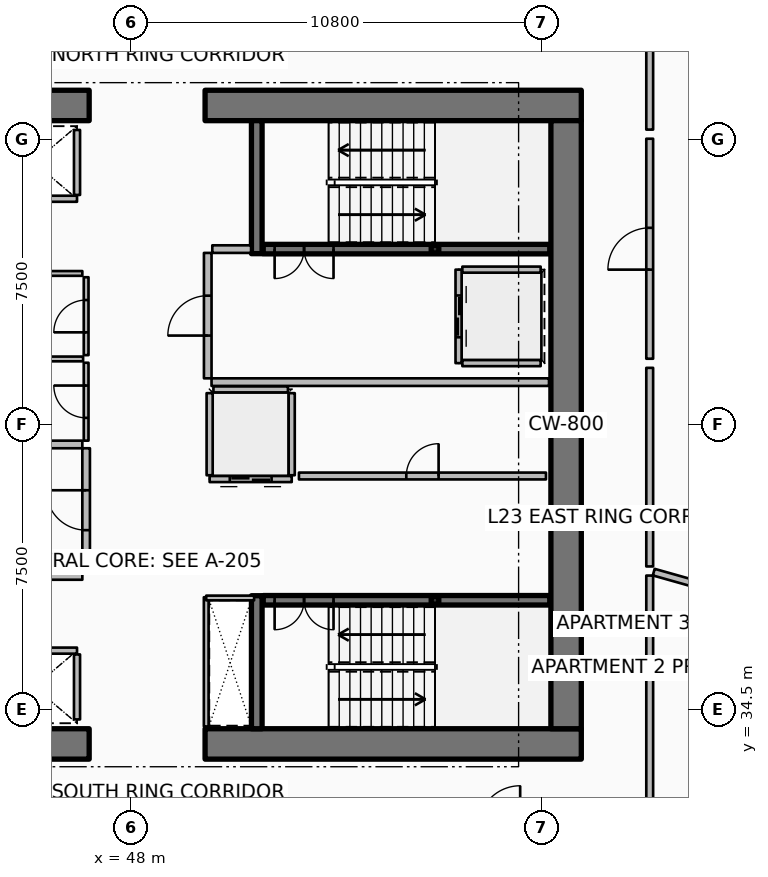
"""IFC4 building model, lengths in metres.
Left out: names, types, materials, properties, quantities, classifications, styles, units other than length and angle.
Written with IfcOpenShell. Run it as: python <this file> out.ifc"""

import sys

from ifc_helpers import new_model, si_unit, direction, frame, frame_2d, origin, origin_2d, place, context, subcontext, project, spatial, rectangle, hollow_rectangle, extrude, element, fill, save


model = new_model("IFC4")
c1 = context("Model", 3, precision=1e-05, world=origin(), true_north=direction((0.0, 1.0)))
c2 = subcontext(c1, "Body", "Model", "MODEL_VIEW")
j1 = project(units=[si_unit("LENGTHUNIT", "METRE"), si_unit("PLANEANGLEUNIT", "RADIAN")], contexts=[c1])
p1 = place(None, origin())
s1 = spatial("IfcSite", under=j1, at=p1, CompositionType="ELEMENT")
p2 = place(p1, origin())
s2 = spatial("IfcBuilding", under=s1, at=p2, CompositionType="ELEMENT")
p3 = place(p2, frame((0.0, 0.0, 93.9)))
s3 = spatial("IfcBuildingStorey", under=s2, at=p3, CompositionType="ELEMENT", Elevation=93.9)
p4 = place(p3, frame((37.0, 33.6, 0.0), z_axis=(0.0, 0.0, 1.0), x_axis=(1.0, 0.0, 0.0)))
e1 = element("IfcWall", 1, at=p4, inside=s3, PredefinedType="SHEAR", context=c2, shape_type="SweptSolid", body=[
    extrude(rectangle(XDim=9.9, YDim=0.8, at=frame_2d((4.95, 0.0))), origin(), (0.0, 0.0, 1.0), 3.75),
])
p5 = place(p3, frame((49.95, 33.6, 0.0), z_axis=(0.0, 0.0, 1.0), x_axis=(1.0, 0.0, 0.0)))
e2 = element("IfcWall", 2, at=p5, inside=s3, PredefinedType="SHEAR", context=c2, shape_type="SweptSolid", body=[
    extrude(rectangle(XDim=9.9, YDim=0.8, at=frame_2d((4.95, 0.0))), origin(), (0.0, 0.0, 1.0), 3.75),
])
p6 = place(p3, frame((37.0, 50.4, 0.0), z_axis=(0.0, 0.0, 1.0), x_axis=(1.0, 0.0, 0.0)))
e3 = element("IfcWall", 3, at=p6, inside=s3, PredefinedType="SHEAR", context=c2, shape_type="SweptSolid", body=[
    extrude(rectangle(XDim=9.9, YDim=0.8, at=frame_2d((4.95, 0.0))), origin(), (0.0, 0.0, 1.0), 3.75),
])
p7 = place(p3, frame((49.95, 50.4, 0.0), z_axis=(0.0, 0.0, 1.0), x_axis=(1.0, 0.0, 0.0)))
e4 = element("IfcWall", 4, at=p7, inside=s3, PredefinedType="SHEAR", context=c2, shape_type="SweptSolid", body=[
    extrude(rectangle(XDim=9.9, YDim=0.8, at=frame_2d((4.95, 0.0))), origin(), (0.0, 0.0, 1.0), 3.75),
])
p8 = place(p3, frame((59.45, 34.0, 0.0), z_axis=(0.0, 0.0, 1.0), x_axis=(0.0, 1.0, 0.0)))
e5 = element("IfcWall", 5, at=p8, inside=s3, PredefinedType="SHEAR", context=c2, shape_type="SweptSolid", body=[
    extrude(rectangle(XDim=16.0, YDim=0.8, at=frame_2d((8.0, 0.0))), origin(), (0.0, 0.0, 1.0), 3.75),
])
for number, where, z_axis, x_axis in (
    (6, (51.31, 46.5, 0.0), (0.0, 0.0, 1.0), (0.0, 1.0, 0.0)),
    (7, (51.31, 34.0, 0.0), (0.0, 0.0, 1.0), (0.0, 1.0, 0.0)),
):
    element("IfcWall", number, at=place(p3, frame(where, z_axis=z_axis, x_axis=x_axis)), inside=s3, PredefinedType="SHEAR", context=c2, shape_type="SweptSolid", body=[
        extrude(rectangle(XDim=3.5, YDim=0.28, at=frame_2d((1.75, 0.0))), origin(), (0.0, 0.0, 1.0), 3.75),
    ])
for number, where, z_axis, x_axis in (
    (8, (56.0, 46.62, 0.0), (0.0, 0.0, 1.0), (1.0, 0.0, 0.0)),
    (9, (56.0, 37.38, 0.0), (0.0, 0.0, 1.0), (1.0, 0.0, 0.0)),
):
    element("IfcColumn", number, at=place(p3, frame(where, z_axis=z_axis, x_axis=x_axis)), inside=s3, PredefinedType="COLUMN", context=c2, shape_type="SweptSolid", body=[
        extrude(hollow_rectangle(XDim=0.2, YDim=0.2, WallThickness=0.01, InnerFilletRadius=0.01, OuterFilletRadius=0.02, at=origin_2d()), origin(), (0.0, 0.0, 1.0), 1.67),
    ])
p9 = place(p3, frame((51.48, 46.62, 0.0), z_axis=(0.0, 0.0, 1.0), x_axis=(1.0, 0.0, 0.0)))
e10 = element("IfcWall", 10, at=p9, inside=s3, PredefinedType="SOLIDWALL", context=c2, shape_type="SweptSolid", body=[
    extrude(rectangle(XDim=7.54, YDim=0.25, at=frame_2d((3.77, 0.0))), origin(), (0.0, 0.0, 1.0), 3.5),
])
p10 = place(p9, frame((0.3, 0.0, 0.0)))
e11 = element("IfcOpeningElement", 11, at=p10, cuts=e10, PredefinedType="OPENING", context=c2, shape_type="SweptSolid", body=[
    extrude(rectangle(XDim=1.55, YDim=2.15, at=frame_2d((0.775, 1.075))), frame((0.0, 0.135, 0.0), z_axis=(0.0, -1.0, 0.0), x_axis=(1.0, 0.0, 0.0)), (0.0, 0.0, 1.0), 0.27),
])
p11 = place(p3, frame((51.48, 37.38, 0.0), z_axis=(0.0, 0.0, 1.0), x_axis=(1.0, 0.0, 0.0)))
e12 = element("IfcWall", 12, at=p11, inside=s3, PredefinedType="SOLIDWALL", context=c2, shape_type="SweptSolid", body=[
    extrude(rectangle(XDim=7.54, YDim=0.25, at=frame_2d((3.77, 0.0))), origin(), (0.0, 0.0, 1.0), 3.5),
])
p12 = place(p11, frame((0.3, 0.0, 0.0)))
e13 = element("IfcOpeningElement", 13, at=p12, cuts=e12, PredefinedType="OPENING", context=c2, shape_type="SweptSolid", body=[
    extrude(rectangle(XDim=1.55, YDim=2.15, at=frame_2d((0.775, 1.075))), frame((0.0, 0.135, 0.0), z_axis=(0.0, -1.0, 0.0), x_axis=(1.0, 0.0, 0.0)), (0.0, 0.0, 1.0), 0.27),
])
p13 = place(p3, frame((46.58, 47.945, 0.0), z_axis=(0.0, 0.0, 1.0), x_axis=(-1.0, 0.0, 0.0)))
e14 = element("IfcWall", 14, at=p13, inside=s3, PredefinedType="PARTITIONING", context=c2, shape_type="SweptSolid", body=[
    extrude(rectangle(XDim=2.26, YDim=0.16, at=frame_2d((1.13, 0.0))), origin(), (0.0, 0.0, 1.0), 3.5),
])
p14 = place(p3, frame((46.58, 48.045, 0.0), z_axis=(0.0, 0.0, 1.0), x_axis=(0.0, 1.0, 0.0)))
e15 = element("IfcWall", 15, at=p14, inside=s3, PredefinedType="PARTITIONING", context=c2, shape_type="SweptSolid", body=[
    extrude(rectangle(XDim=1.71, YDim=0.16, at=frame_2d((0.855, 0.0))), origin(), (0.0, 0.0, 1.0), 3.5),
])
p15 = place(p3, frame((44.32, 36.055, 0.0), z_axis=(0.0, 0.0, 1.0), x_axis=(1.0, 0.0, 0.0)))
e16 = element("IfcWall", 16, at=p15, inside=s3, PredefinedType="PARTITIONING", context=c2, shape_type="SweptSolid", body=[
    extrude(rectangle(XDim=2.26, YDim=0.16, at=frame_2d((1.13, 0.0))), origin(), (0.0, 0.0, 1.0), 3.5),
])
p16 = place(p3, frame((46.58, 34.245, 0.0), z_axis=(0.0, 0.0, 1.0), x_axis=(0.0, 1.0, 0.0)))
e17 = element("IfcWall", 17, at=p16, inside=s3, PredefinedType="PARTITIONING", context=c2, shape_type="SweptSolid", body=[
    extrude(rectangle(XDim=1.71, YDim=0.16, at=frame_2d((0.855, 0.0))), origin(), (0.0, 0.0, 1.0), 3.5),
])
p17 = place(p3, frame((56.62, 46.08, 0.0), z_axis=(0.0, 0.0, 1.0), x_axis=(0.0, -1.0, 0.0)))
e18 = element("IfcWall", 18, at=p17, inside=s3, PredefinedType="PARTITIONING", context=c2, shape_type="SweptSolid", body=[
    extrude(rectangle(XDim=2.46, YDim=0.16, at=frame_2d((1.23, 0.0))), origin(), (0.0, 0.0, 1.0), 3.5),
])
p18 = place(p17, frame((0.68, 0.0, 0.0)))
e19 = element("IfcOpeningElement", 19, at=p18, cuts=e18, PredefinedType="OPENING", context=c2, shape_type="SweptSolid", body=[
    extrude(rectangle(XDim=1.1, YDim=2.1, at=frame_2d((0.55, 1.05))), frame((0.0, 0.09, 0.0), z_axis=(0.0, -1.0, 0.0), x_axis=(1.0, 0.0, 0.0)), (0.0, 0.0, 1.0), 0.18),
])
for number, where, z_axis, x_axis in (
    (20, (56.72, 46.08, 0.0), (0.0, 0.0, 1.0), (1.0, 0.0, 0.0)),
    (21, (56.72, 43.62, 0.0), (0.0, 0.0, 1.0), (1.0, 0.0, 0.0)),
):
    element("IfcWall", number, at=place(p3, frame(where, z_axis=z_axis, x_axis=x_axis)), inside=s3, PredefinedType="PARTITIONING", context=c2, shape_type="SweptSolid", body=[
        extrude(rectangle(XDim=2.06, YDim=0.16, at=frame_2d((1.03, 0.0))), origin(), (0.0, 0.0, 1.0), 3.5),
    ])
p19 = place(p3, frame((52.23, 40.57, 0.0), z_axis=(0.0, 0.0, 1.0), x_axis=(-1.0, 0.0, 0.0)))
e22 = element("IfcWall", 22, at=p19, inside=s3, PredefinedType="PARTITIONING", context=c2, shape_type="SweptSolid", body=[
    extrude(rectangle(XDim=2.16, YDim=0.16, at=frame_2d((1.08, 0.0))), origin(), (0.0, 0.0, 1.0), 3.5),
])
p20 = place(p19, frame((0.53, 0.0, 0.0)))
e23 = element("IfcOpeningElement", 23, at=p20, cuts=e22, PredefinedType="OPENING", context=c2, shape_type="SweptSolid", body=[
    extrude(rectangle(XDim=1.1, YDim=2.1, at=frame_2d((0.55, 1.05))), frame((0.0, 0.09, 0.0), z_axis=(0.0, -1.0, 0.0), x_axis=(1.0, 0.0, 0.0)), (0.0, 0.0, 1.0), 0.18),
])
for number, where, z_axis, x_axis in (
    (24, (52.23, 40.67, 0.0), (0.0, 0.0, 1.0), (0.0, 1.0, 0.0)),
    (25, (50.07, 40.67, 0.0), (0.0, 0.0, 1.0), (0.0, 1.0, 0.0)),
):
    element("IfcWall", number, at=place(p3, frame(where, z_axis=z_axis, x_axis=x_axis)), inside=s3, PredefinedType="PARTITIONING", context=c2, shape_type="SweptSolid", body=[
        extrude(rectangle(XDim=2.16, YDim=0.16, at=frame_2d((1.08, 0.0))), origin(), (0.0, 0.0, 1.0), 3.5),
    ])
p21 = place(p3, frame((50.17, 42.93, 0.0), z_axis=(0.0, 0.0, 1.0), x_axis=(1.0, 0.0, 0.0)))
e26 = element("IfcWall", 26, at=p21, inside=s3, PredefinedType="PARTITIONING", context=c2, shape_type="SweptSolid", body=[
    extrude(rectangle(XDim=1.96, YDim=0.16, at=frame_2d((0.98, 0.0))), origin(), (0.0, 0.0, 1.0), 3.5),
])
p22 = place(p3, frame((52.42, 40.65, 0.0), z_axis=(0.0, 0.0, 1.0), x_axis=(1.0, 0.0, 0.0)))
e27 = element("IfcWall", 27, at=p22, inside=s3, PredefinedType="PARTITIONING", context=c2, shape_type="SweptSolid", body=[
    extrude(rectangle(XDim=6.5, YDim=0.18, at=frame_2d((3.25, 0.0))), origin(), (0.0, 0.0, 1.0), 3.5),
])
p23 = place(p22, frame((2.825, 0.0, 0.0)))
e28 = element("IfcOpeningElement", 28, at=p23, cuts=e27, PredefinedType="OPENING", context=c2, shape_type="SweptSolid", body=[
    extrude(rectangle(XDim=0.85, YDim=2.06, at=frame_2d((0.425, 1.03))), frame((0.0, 0.1, 0.0), z_axis=(0.0, -1.0, 0.0), x_axis=(1.0, 0.0, 0.0)), (0.0, 0.0, 1.0), 0.2),
])
p24 = place(p3, frame((41.35, 38.02, 0.0), z_axis=(0.0, 0.0, 1.0), x_axis=(1.0, 0.0, 0.0)))
e29 = element("IfcWall", 29, at=p24, inside=s3, PredefinedType="PARTITIONING", context=c2, shape_type="SweptSolid", body=[
    extrude(rectangle(XDim=5.37, YDim=0.2, at=frame_2d((2.685, 0.0))), origin(), (0.0, 0.0, 1.0), 3.5),
])
p25 = place(p3, frame((43.92, 41.48, 0.0), z_axis=(0.0, 0.0, 1.0), x_axis=(1.0, 0.0, 0.0)))
e30 = element("IfcWall", 30, at=p25, inside=s3, PredefinedType="PARTITIONING", context=c2, shape_type="SweptSolid", body=[
    extrude(rectangle(XDim=2.8, YDim=0.2, at=frame_2d((1.4, 0.0))), origin(), (0.0, 0.0, 1.0), 3.5),
])
p26 = place(p3, frame((46.82, 38.12, 0.0), z_axis=(0.0, 0.0, 1.0), x_axis=(0.0, 1.0, 0.0)))
e31 = element("IfcWall", 31, at=p26, inside=s3, PredefinedType="PARTITIONING", context=c2, shape_type="SweptSolid", body=[
    extrude(rectangle(XDim=3.26, YDim=0.2, at=frame_2d((1.63, 0.0))), origin(), (0.0, 0.0, 1.0), 3.5),
])
p27 = place(p26, frame((1.105, 0.0, 0.0)))
e32 = element("IfcOpeningElement", 32, at=p27, cuts=e31, PredefinedType="OPENING", context=c2, shape_type="SweptSolid", body=[
    extrude(rectangle(XDim=1.05, YDim=2.1, at=frame_2d((0.525, 1.05))), frame((0.0, 0.11, 0.0), z_axis=(0.0, -1.0, 0.0), x_axis=(1.0, 0.0, 0.0)), (0.0, 0.0, 1.0), 0.22),
])
p28 = place(p3, frame((50.12, 43.12, 0.0), z_axis=(0.0, 0.0, 1.0), x_axis=(1.0, 0.0, 0.0)))
e33 = element("IfcWall", 33, at=p28, inside=s3, PredefinedType="PARTITIONING", context=c2, shape_type="SweptSolid", body=[
    extrude(rectangle(XDim=8.88, YDim=0.2, at=frame_2d((4.44, 0.0))), origin(), (0.0, 0.0, 1.0), 3.5),
])
p29 = place(p3, frame((50.14, 46.62, 0.0), z_axis=(0.0, 0.0, 1.0), x_axis=(1.0, 0.0, 0.0)))
e34 = element("IfcWall", 34, at=p29, inside=s3, PredefinedType="PARTITIONING", context=c2, shape_type="SweptSolid", body=[
    extrude(rectangle(XDim=1.02, YDim=0.2, at=frame_2d((0.51, 0.0))), origin(), (0.0, 0.0, 1.0), 3.5),
])
p30 = place(p3, frame((50.02, 43.22, 0.0), z_axis=(0.0, 0.0, 1.0), x_axis=(0.0, 1.0, 0.0)))
e35 = element("IfcWall", 35, at=p30, inside=s3, PredefinedType="PARTITIONING", context=c2, shape_type="SweptSolid", body=[
    extrude(rectangle(XDim=3.3, YDim=0.2, at=frame_2d((1.65, 0.0))), origin(), (0.0, 0.0, 1.0), 3.5),
])
p31 = place(p30, frame((1.125, 0.0, 0.0)))
e36 = element("IfcOpeningElement", 36, at=p31, cuts=e35, PredefinedType="OPENING", context=c2, shape_type="SweptSolid", body=[
    extrude(rectangle(XDim=1.05, YDim=2.1, at=frame_2d((0.525, 1.05))), frame((0.0, 0.11, 0.0), z_axis=(0.0, -1.0, 0.0), x_axis=(1.0, 0.0, 0.0)), (0.0, 0.0, 1.0), 0.22),
])
p32 = place(p3, frame((41.36, 45.98, 0.0), z_axis=(0.0, 0.0, 1.0), x_axis=(1.0, 0.0, 0.0)))
e37 = element("IfcWall", 37, at=p32, inside=s3, PredefinedType="PARTITIONING", context=c2, shape_type="SweptSolid", body=[
    extrude(rectangle(XDim=5.36, YDim=0.125, at=frame_2d((2.68, 0.0))), origin(), (0.0, 0.0, 1.0), 2.94),
])
p33 = place(p3, frame((49.98, 34.06, 0.0), z_axis=(0.0, 0.0, 1.0), x_axis=(0.0, 1.0, 0.0)))
e38 = element("IfcWall", 38, at=p33, inside=s3, PredefinedType="PARTITIONING", context=c2, shape_type="SweptSolid", body=[
    extrude(rectangle(XDim=3.4, YDim=0.125, at=frame_2d((1.7, 0.0))), origin(), (0.0, 0.0, 1.0), 2.94),
])
p34 = place(p3, frame((49.98, 37.44, 0.0), z_axis=(0.0, 0.0, 1.0), x_axis=(1.0, 0.0, 0.0)))
e39 = element("IfcWall", 39, at=p34, inside=s3, PredefinedType="PARTITIONING", context=c2, shape_type="SweptSolid", body=[
    extrude(rectangle(XDim=1.26, YDim=0.125, at=frame_2d((0.63, 0.0))), origin(), (0.0, 0.0, 1.0), 2.94),
])
p35 = place(p3, frame((44.03, 43.73, 0.0), z_axis=(0.0, 0.0, 1.0), x_axis=(1.0, 0.0, 0.0)))
e40 = element("IfcWall", 40, at=p35, inside=s3, PredefinedType="PARTITIONING", context=c2, shape_type="SweptSolid", body=[
    extrude(rectangle(XDim=2.71, YDim=0.125, at=frame_2d((1.355, 0.0))), origin(), (0.0, 0.0, 1.0), 2.94),
])
p36 = place(p3, frame((46.82, 41.58, 0.0), z_axis=(0.0, 0.0, 1.0), x_axis=(0.0, 1.0, 0.0)))
e41 = element("IfcWall", 41, at=p36, inside=s3, PredefinedType="PARTITIONING", context=c2, shape_type="SweptSolid", body=[
    extrude(rectangle(XDim=2.05, YDim=0.125, at=frame_2d((1.025, 0.0))), origin(), (0.0, 0.0, 1.0), 2.94),
])
p37 = place(p36, frame((0.6, 0.0, 0.0)))
e42 = element("IfcOpeningElement", 42, at=p37, cuts=e41, PredefinedType="OPENING", context=c2, shape_type="SweptSolid", body=[
    extrude(rectangle(XDim=0.85, YDim=2.06, at=frame_2d((0.425, 1.03))), frame((0.0, 0.073, 0.0), z_axis=(0.0, -1.0, 0.0), x_axis=(1.0, 0.0, 0.0)), (0.0, 0.0, 1.0), 0.145),
])
p38 = place(p3, frame((46.82, 43.83, 0.0), z_axis=(0.0, 0.0, 1.0), x_axis=(0.0, 1.0, 0.0)))
e43 = element("IfcWall", 43, at=p38, inside=s3, PredefinedType="PARTITIONING", context=c2, shape_type="SweptSolid", body=[
    extrude(rectangle(XDim=2.05, YDim=0.125, at=frame_2d((1.025, 0.0))), origin(), (0.0, 0.0, 1.0), 2.94),
])
p39 = place(p38, frame((0.6, 0.0, 0.0)))
e44 = element("IfcOpeningElement", 44, at=p39, cuts=e43, PredefinedType="OPENING", context=c2, shape_type="SweptSolid", body=[
    extrude(rectangle(XDim=0.85, YDim=2.06, at=frame_2d((0.425, 1.03))), frame((0.0, 0.073, 0.0), z_axis=(0.0, -1.0, 0.0), x_axis=(1.0, 0.0, 0.0)), (0.0, 0.0, 1.0), 0.145),
])
p40 = place(p3, frame((61.756, 38.12, 0.0), z_axis=(0.0, 0.0, 1.0), x_axis=(0.962455861176, -0.271438234756, 0.0)))
e45 = element("IfcWall", 45, at=p40, inside=s3, PredefinedType="PARTITIONING", context=c2, shape_type="SweptSolid", body=[
    extrude(rectangle(XDim=14.279, YDim=0.18, at=frame_2d((7.139, 0.0))), origin(), (0.0, 0.0, 1.0), 2.94),
])
p41 = place(p3, frame((61.65, 31.52, 0.0), z_axis=(0.0, 0.0, 1.0), x_axis=(0.0, 1.0, 0.0)))
e46 = element("IfcWall", 46, at=p41, inside=s3, PredefinedType="PARTITIONING", context=c2, shape_type="SweptSolid", body=[
    extrude(rectangle(XDim=6.51, YDim=0.18, at=frame_2d((3.255, 0.0))), origin(), (0.0, 0.0, 1.0), 2.94),
])
p42 = place(p3, frame((61.65, 43.736, 0.0), z_axis=(0.0, 0.0, 1.0), x_axis=(0.0, 1.0, 0.0)))
e47 = element("IfcWall", 47, at=p42, inside=s3, PredefinedType="PARTITIONING", context=c2, shape_type="SweptSolid", body=[
    extrude(rectangle(XDim=5.789, YDim=0.18, at=frame_2d((2.895, 0.0))), origin(), (0.0, 0.0, 1.0), 2.94),
])
p43 = place(p42, frame((2.344, 0.0, 0.0)))
e48 = element("IfcOpeningElement", 48, at=p43, cuts=e47, PredefinedType="OPENING", context=c2, shape_type="SweptSolid", body=[
    extrude(rectangle(XDim=1.1, YDim=2.1, at=frame_2d((0.55, 1.05))), frame((0.0, 0.1, 0.0), z_axis=(0.0, -1.0, 0.0), x_axis=(1.0, 0.0, 0.0)), (0.0, 0.0, 1.0), 0.2),
])
p44 = place(p3, frame((61.65, 38.27, 0.0), z_axis=(0.0, 0.0, 1.0), x_axis=(0.0, 1.0, 0.0)))
e49 = element("IfcWall", 49, at=p44, inside=s3, PredefinedType="PARTITIONING", context=c2, shape_type="SweptSolid", body=[
    extrude(rectangle(XDim=5.225, YDim=0.18, at=frame_2d((2.613, 0.0))), origin(), (0.0, 0.0, 1.0), 2.94),
])
p45 = place(p3, frame((61.65, 49.764, 0.0), z_axis=(0.0, 0.0, 1.0), x_axis=(0.0, 1.0, 0.0)))
e50 = element("IfcWall", 50, at=p45, inside=s3, PredefinedType="PARTITIONING", context=c2, shape_type="SweptSolid", body=[
    extrude(rectangle(XDim=2.716, YDim=0.18, at=frame_2d((1.358, 0.0))), origin(), (0.0, 0.0, 1.0), 2.94),
])
p46 = place(p10, origin())
e51 = element("IfcDoor", 51, at=p46, inside=s3, OperationType="DOUBLE_DOOR_SINGLE_SWING", PredefinedType="DOOR", context=c2, shape_type="SweptSolid", body=[
    extrude(rectangle(XDim=1.55, YDim=2.15, at=frame_2d((0.775, 1.075))), frame((0.0, 0.025, 0.0), z_axis=(0.0, -1.0, 0.0), x_axis=(1.0, 0.0, 0.0)), (0.0, 0.0, 1.0), 0.05),
])
fill(e11, e51)
p47 = place(p12, origin())
e52 = element("IfcDoor", 52, at=p47, inside=s3, OperationType="DOUBLE_DOOR_SINGLE_SWING", PredefinedType="DOOR", context=c2, shape_type="SweptSolid", body=[
    extrude(rectangle(XDim=1.55, YDim=2.15, at=frame_2d((0.775, 1.075))), frame((0.0, 0.025, 0.0), z_axis=(0.0, -1.0, 0.0), x_axis=(1.0, 0.0, 0.0)), (0.0, 0.0, 1.0), 0.05),
])
fill(e13, e52)
p48 = place(p18, origin())
e53 = element("IfcDoor", 53, at=p48, inside=s3, OperationType="DOUBLE_DOOR_SLIDING", PredefinedType="DOOR", context=c2, shape_type="SweptSolid", body=[
    extrude(rectangle(XDim=1.1, YDim=2.1, at=frame_2d((0.55, 1.05))), frame((0.0, 0.025, 0.0), z_axis=(0.0, -1.0, 0.0), x_axis=(1.0, 0.0, 0.0)), (0.0, 0.0, 1.0), 0.05),
])
fill(e19, e53)
p49 = place(p20, origin())
e54 = element("IfcDoor", 54, at=p49, inside=s3, OperationType="DOUBLE_DOOR_SLIDING", PredefinedType="DOOR", context=c2, shape_type="SweptSolid", body=[
    extrude(rectangle(XDim=1.1, YDim=2.1, at=frame_2d((0.55, 1.05))), frame((0.0, 0.025, 0.0), z_axis=(0.0, -1.0, 0.0), x_axis=(1.0, 0.0, 0.0)), (0.0, 0.0, 1.0), 0.05),
])
fill(e23, e54)
p50 = place(p23, origin())
e55 = element("IfcDoor", 55, at=p50, inside=s3, OperationType="SINGLE_SWING_RIGHT", PredefinedType="DOOR", context=c2, shape_type="SweptSolid", body=[
    extrude(rectangle(XDim=0.85, YDim=2.06, at=frame_2d((0.425, 1.03))), frame((0.0, 0.025, 0.0), z_axis=(0.0, -1.0, 0.0), x_axis=(1.0, 0.0, 0.0)), (0.0, 0.0, 1.0), 0.05),
])
fill(e28, e55)
p51 = place(p27, origin())
e56 = element("IfcDoor", 56, at=p51, inside=s3, OperationType="SINGLE_SWING_RIGHT", PredefinedType="DOOR", context=c2, shape_type="SweptSolid", body=[
    extrude(rectangle(XDim=1.05, YDim=2.1, at=frame_2d((0.525, 1.05))), frame((0.0, 0.025, 0.0), z_axis=(0.0, -1.0, 0.0), x_axis=(1.0, 0.0, 0.0)), (0.0, 0.0, 1.0), 0.05),
])
fill(e32, e56)
p52 = place(p31, origin())
e57 = element("IfcDoor", 57, at=p52, inside=s3, OperationType="SINGLE_SWING_LEFT", PredefinedType="DOOR", context=c2, shape_type="SweptSolid", body=[
    extrude(rectangle(XDim=1.05, YDim=2.1, at=frame_2d((0.525, 1.05))), frame((0.0, 0.025, 0.0), z_axis=(0.0, -1.0, 0.0), x_axis=(1.0, 0.0, 0.0)), (0.0, 0.0, 1.0), 0.05),
])
fill(e36, e57)
p53 = place(p37, origin())
e58 = element("IfcDoor", 58, at=p53, inside=s3, OperationType="SINGLE_SWING_RIGHT", PredefinedType="DOOR", context=c2, shape_type="SweptSolid", body=[
    extrude(rectangle(XDim=0.85, YDim=2.06, at=frame_2d((0.425, 1.03))), frame((0.0, 0.025, 0.0), z_axis=(0.0, -1.0, 0.0), x_axis=(1.0, 0.0, 0.0)), (0.0, 0.0, 1.0), 0.05),
])
fill(e42, e58)
p54 = place(p39, origin())
e59 = element("IfcDoor", 59, at=p54, inside=s3, OperationType="SINGLE_SWING_LEFT", PredefinedType="DOOR", context=c2, shape_type="SweptSolid", body=[
    extrude(rectangle(XDim=0.85, YDim=2.06, at=frame_2d((0.425, 1.03))), frame((0.0, 0.025, 0.0), z_axis=(0.0, -1.0, 0.0), x_axis=(1.0, 0.0, 0.0)), (0.0, 0.0, 1.0), 0.05),
])
fill(e44, e59)
p55 = place(p43, origin())
e60 = element("IfcDoor", 60, at=p55, inside=s3, OperationType="SINGLE_SWING_LEFT", PredefinedType="DOOR", context=c2, shape_type="SweptSolid", body=[
    extrude(rectangle(XDim=1.1, YDim=2.1, at=frame_2d((0.55, 1.05))), frame((0.0, 0.025, 0.0), z_axis=(0.0, -1.0, 0.0), x_axis=(1.0, 0.0, 0.0)), (0.0, 0.0, 1.0), 0.05),
])
fill(e48, e60)
save(model, sys.argv[1])
